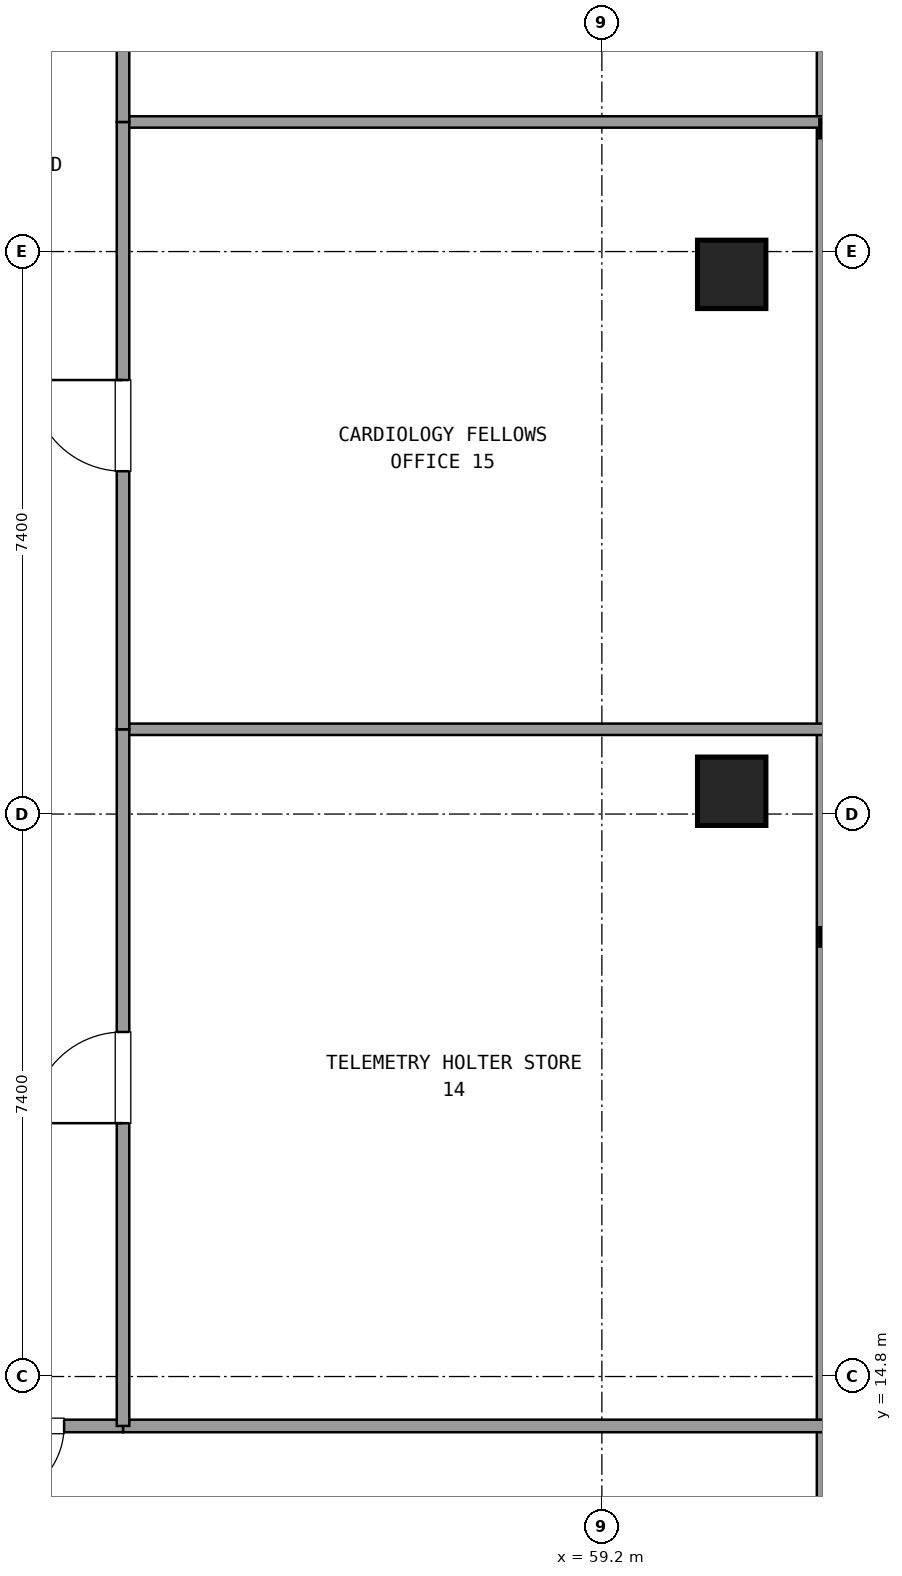
"""IFC4 building model, lengths in metres.
Left out: names, types, materials, properties, quantities, classifications, styles, units other than length and angle.
Written with IfcOpenShell. Run it as: python <this file> out.ifc"""

import sys

from ifc_helpers import new_model, si_unit, direction, frame, frame_2d, origin, origin_2d, place, context, subcontext, project, spatial, rectangle, extrude, element, fill, save


model = new_model("IFC4")
c1 = context("Model", 3, precision=1e-05, world=origin(), true_north=direction((0.0, 1.0)))
c2 = subcontext(c1, "Body", "Model", "MODEL_VIEW")
j1 = project(units=[si_unit("LENGTHUNIT", "METRE"), si_unit("PLANEANGLEUNIT", "RADIAN")], contexts=[c1])
p1 = place(None, origin())
s1 = spatial("IfcSite", under=j1, at=p1, CompositionType="ELEMENT")
p2 = place(p1, origin())
s2 = spatial("IfcBuilding", under=s1, at=p2, CompositionType="ELEMENT")
p3 = place(p2, frame((0.0, 0.0, 199.98)))
s3 = spatial("IfcBuildingStorey", under=s2, at=p3, CompositionType="ELEMENT", Elevation=199.98)
for number, where, z_axis, x_axis in (
    (1, (60.908, 22.5, 0.021), (0.085, 0.0, 0.996), (0.0, 1.0, 0.0)),
    (2, (60.908, 29.3, 0.021), (0.085, 0.0, 0.996), (0.0, 1.0, 0.0)),
):
    element("IfcColumn", number, at=place(p3, frame(where, z_axis=z_axis, x_axis=x_axis)), inside=s3, PredefinedType="COLUMN", context=c2, shape_type="SweptSolid", body=[
        extrude(rectangle(XDim=0.9, YDim=0.9, at=origin_2d()), origin(), (0.0, 0.0, 1.0), 3.571),
    ])
p4 = place(p3, frame((62.148, 9.949, 0.0), z_axis=(0.0, 0.0, 1.0), x_axis=(0.0, 1.0, 0.0)))
e3 = element("IfcWall", 3, at=p4, inside=s3, PredefinedType="SOLIDWALL", context=c2, shape_type="SweptSolid", body=[
    extrude(rectangle(XDim=31.902, YDim=0.24, at=frame_2d((15.951, 0.0))), origin(), (0.0, 0.0, 1.0), 0.85),
])
p5 = place(p3, frame((52.9, 14.15, 0.0), z_axis=(0.0, 0.0, 1.0), x_axis=(1.0, 0.0, 0.0)))
e4 = element("IfcWall", 4, at=p5, inside=s3, PredefinedType="PARTITIONING", context=c2, shape_type="SweptSolid", body=[
    extrude(rectangle(XDim=9.228, YDim=0.165, at=frame_2d((4.614, 0.0))), origin(), (0.0, 0.0, 1.0), 2.61),
])
p6 = place(p3, frame((50.35, 14.15, 0.0), z_axis=(0.0, 0.0, 1.0), x_axis=(1.0, 0.0, 0.0)))
e5 = element("IfcWall", 5, at=p6, inside=s3, PredefinedType="PARTITIONING", context=c2, shape_type="SweptSolid", body=[
    extrude(rectangle(XDim=2.55, YDim=0.165, at=frame_2d((1.275, 0.0))), origin(), (0.0, 0.0, 1.0), 2.61),
])
p7 = place(p6, frame((0.775, 0.0, 0.0)))
e6 = element("IfcOpeningElement", 6, at=p7, cuts=e5, PredefinedType="OPENING", context=c2, shape_type="SweptSolid", body=[
    extrude(rectangle(XDim=1.0, YDim=2.15, at=frame_2d((0.5, 1.075))), frame((0.0, 0.093, 0.0), z_axis=(0.0, -1.0, 0.0), x_axis=(1.0, 0.0, 0.0)), (0.0, 0.0, 1.0), 0.185),
])
p8 = place(p3, frame((52.9, 23.315, 0.0), z_axis=(0.0, 0.0, 1.0), x_axis=(1.0, 0.0, 0.0)))
e7 = element("IfcWall", 7, at=p8, inside=s3, PredefinedType="PARTITIONING", context=c2, shape_type="SweptSolid", body=[
    extrude(rectangle(XDim=9.228, YDim=0.15, at=frame_2d((4.614, 0.0))), origin(), (0.0, 0.0, 1.0), 2.61),
])
p9 = place(p3, frame((52.9, 14.15, 0.0), z_axis=(0.0, 0.0, 1.0), x_axis=(0.0, 1.0, 0.0)))
e8 = element("IfcWall", 8, at=p9, inside=s3, PredefinedType="PARTITIONING", context=c2, shape_type="SweptSolid", body=[
    extrude(rectangle(XDim=9.165, YDim=0.165, at=frame_2d((4.583, 0.0))), origin(), (0.0, 0.0, 1.0), 2.61),
])
p10 = place(p9, frame((3.983, 0.0, 0.0)))
e9 = element("IfcOpeningElement", 9, at=p10, cuts=e8, PredefinedType="OPENING", context=c2, shape_type="SweptSolid", body=[
    extrude(rectangle(XDim=1.2, YDim=2.15, at=frame_2d((0.6, 1.075))), frame((0.0, 0.093, 0.0), z_axis=(0.0, -1.0, 0.0), x_axis=(1.0, 0.0, 0.0)), (0.0, 0.0, 1.0), 0.185),
])
p11 = place(p3, frame((52.9, 31.305, 0.0), z_axis=(0.0, 0.0, 1.0), x_axis=(1.0, 0.0, 0.0)))
e10 = element("IfcWall", 10, at=p11, inside=s3, PredefinedType="PARTITIONING", context=c2, shape_type="SweptSolid", body=[
    extrude(rectangle(XDim=9.228, YDim=0.15, at=frame_2d((4.614, 0.0))), origin(), (0.0, 0.0, 1.0), 2.61),
])
p12 = place(p3, frame((52.9, 23.315, 0.0), z_axis=(0.0, 0.0, 1.0), x_axis=(0.0, 1.0, 0.0)))
e11 = element("IfcWall", 11, at=p12, inside=s3, PredefinedType="PARTITIONING", context=c2, shape_type="SweptSolid", body=[
    extrude(rectangle(XDim=7.99, YDim=0.165, at=frame_2d((3.995, 0.0))), origin(), (0.0, 0.0, 1.0), 2.61),
])
p13 = place(p12, frame((3.395, 0.0, 0.0)))
e12 = element("IfcOpeningElement", 12, at=p13, cuts=e11, PredefinedType="OPENING", context=c2, shape_type="SweptSolid", body=[
    extrude(rectangle(XDim=1.2, YDim=2.15, at=frame_2d((0.6, 1.075))), frame((0.0, 0.093, 0.0), z_axis=(0.0, -1.0, 0.0), x_axis=(1.0, 0.0, 0.0)), (0.0, 0.0, 1.0), 0.185),
])
p14 = place(p3, frame((52.9, 31.305, 0.0), z_axis=(0.0, 0.0, 1.0), x_axis=(0.0, 1.0, 0.0)))
e13 = element("IfcWall", 13, at=p14, inside=s3, PredefinedType="PARTITIONING", context=c2, shape_type="SweptSolid", body=[
    extrude(rectangle(XDim=6.345, YDim=0.165, at=frame_2d((3.172, 0.0))), origin(), (0.0, 0.0, 1.0), 2.61),
])
p15 = place(p14, frame((2.572, 0.0, 0.0)))
e14 = element("IfcOpeningElement", 14, at=p15, cuts=e13, PredefinedType="OPENING", context=c2, shape_type="SweptSolid", body=[
    extrude(rectangle(XDim=1.2, YDim=2.15, at=frame_2d((0.6, 1.075))), frame((0.0, 0.093, 0.0), z_axis=(0.0, -1.0, 0.0), x_axis=(1.0, 0.0, 0.0)), (0.0, 0.0, 1.0), 0.185),
])
p16 = place(p7, frame((1.0, 0.0, 0.0), z_axis=(0.0, 0.0, 1.0), x_axis=(-1.0, 0.0, 0.0)))
e15 = element("IfcDoor", 15, at=p16, inside=s3, OperationType="SINGLE_SWING_LEFT", PredefinedType="DOOR", context=c2, shape_type="SweptSolid", body=[
    extrude(rectangle(XDim=1.0, YDim=2.15, at=frame_2d((0.5, 1.075))), frame((0.0, 0.025, 0.0), z_axis=(0.0, -1.0, 0.0), x_axis=(1.0, 0.0, 0.0)), (0.0, 0.0, 1.0), 0.05),
])
fill(e6, e15)
p17 = place(p10, origin())
e16 = element("IfcDoor", 16, at=p17, inside=s3, OperationType="SINGLE_SWING_LEFT", PredefinedType="DOOR", context=c2, shape_type="SweptSolid", body=[
    extrude(rectangle(XDim=1.2, YDim=2.15, at=frame_2d((0.6, 1.075))), frame((0.0, 0.025, 0.0), z_axis=(0.0, -1.0, 0.0), x_axis=(1.0, 0.0, 0.0)), (0.0, 0.0, 1.0), 0.05),
])
fill(e9, e16)
p18 = place(p13, origin())
e17 = element("IfcDoor", 17, at=p18, inside=s3, OperationType="SINGLE_SWING_RIGHT", PredefinedType="DOOR", context=c2, shape_type="SweptSolid", body=[
    extrude(rectangle(XDim=1.2, YDim=2.15, at=frame_2d((0.6, 1.075))), frame((0.0, 0.025, 0.0), z_axis=(0.0, -1.0, 0.0), x_axis=(1.0, 0.0, 0.0)), (0.0, 0.0, 1.0), 0.05),
])
fill(e12, e17)
save(model, sys.argv[1])
